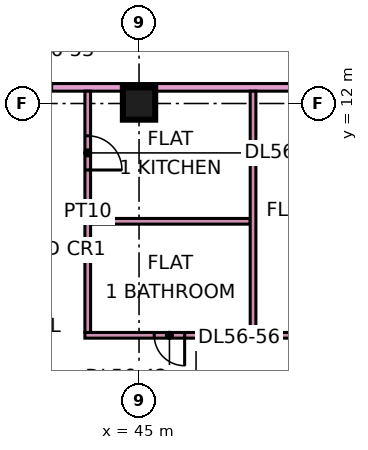
"""IFC4 building model, lengths in metres.
Left out: names, types, materials, properties, quantities, classifications, styles, units other than length and angle.
Written with IfcOpenShell. Run it as: python <this file> out.ifc"""

import sys

from ifc_helpers import new_model, si_unit, direction, frame, frame_2d, origin, origin_2d, place, context, subcontext, project, spatial, rectangle, extrude, element, fill, save


model = new_model("IFC4")
c1 = context("Model", 3, precision=1e-05, world=origin(), true_north=direction((0.0, 1.0)))
c2 = subcontext(c1, "Body", "Model", "MODEL_VIEW")
j1 = project(units=[si_unit("LENGTHUNIT", "METRE"), si_unit("PLANEANGLEUNIT", "RADIAN")], contexts=[c1])
p1 = place(None, origin())
s1 = spatial("IfcSite", under=j1, at=p1, CompositionType="ELEMENT")
p2 = place(p1, origin())
s2 = spatial("IfcBuilding", under=s1, at=p2, CompositionType="ELEMENT")
p3 = place(p2, frame((0.0, 0.0, 237.9)))
s3 = spatial("IfcBuildingStorey", under=s2, at=p3, CompositionType="ELEMENT", Elevation=237.9)
p4 = place(p3, frame((45.0, 12.0, 0.0), z_axis=(0.0, 0.0, 1.0), x_axis=(1.0, 0.0, 0.0)))
e1 = element("IfcColumn", 1, at=p4, inside=s3, PredefinedType="COLUMN", context=c2, shape_type="SweptSolid", body=[
    extrude(rectangle(XDim=0.85, YDim=0.85, at=origin_2d()), origin(), (0.0, 0.0, 1.0), 3.75),
])
p5 = place(p3, frame((40.65, 12.425, 0.0), z_axis=(0.0, 0.0, 1.0), x_axis=(1.0, 0.0, 0.0)))
e2 = element("IfcWall", 2, at=p5, inside=s3, PredefinedType="PARTITIONING", context=c2, shape_type="SweptSolid", body=[
    extrude(rectangle(XDim=22.35, YDim=0.2, at=frame_2d((11.175, 0.0))), origin(), (0.0, 0.0, 1.0), 3.35),
])
p6 = place(p5, frame((14.7, 0.0, 0.0)))
e3 = element("IfcOpeningElement", 3, at=p6, cuts=e2, PredefinedType="OPENING", context=c2, shape_type="SweptSolid", body=[
    extrude(rectangle(XDim=1.0, YDim=2.1, at=frame_2d((0.5, 1.05))), frame((0.0, 0.11, 0.0), z_axis=(0.0, -1.0, 0.0), x_axis=(1.0, 0.0, 0.0)), (0.0, 0.0, 1.0), 0.22),
])
p7 = place(p5, frame((1.05, 0.0, 0.0)))
e4 = element("IfcOpeningElement", 4, at=p7, cuts=e2, PredefinedType="OPENING", context=c2, shape_type="SweptSolid", body=[
    extrude(rectangle(XDim=1.0, YDim=2.1, at=frame_2d((0.5, 1.05))), frame((0.0, 0.11, 0.0), z_axis=(0.0, -1.0, 0.0), x_axis=(1.0, 0.0, 0.0)), (0.0, 0.0, 1.0), 0.22),
])
p8 = place(p3, frame((43.575, 5.9, 0.0), z_axis=(0.0, 0.0, 1.0), x_axis=(1.0, 0.0, 0.0)))
e5 = element("IfcWall", 5, at=p8, inside=s3, PredefinedType="PARTITIONING", context=c2, shape_type="SweptSolid", body=[
    extrude(rectangle(XDim=10.325, YDim=0.15, at=frame_2d((5.163, 0.0))), origin(), (0.0, 0.0, 1.0), 3.35),
])
p9 = place(p8, frame((1.825, 0.0, 0.0)))
e6 = element("IfcOpeningElement", 6, at=p9, cuts=e5, PredefinedType="OPENING", context=c2, shape_type="SweptSolid", body=[
    extrude(rectangle(XDim=0.8, YDim=2.1, at=frame_2d((0.4, 1.05))), frame((0.0, 0.085, 0.0), z_axis=(0.0, -1.0, 0.0), x_axis=(1.0, 0.0, 0.0)), (0.0, 0.0, 1.0), 0.17),
])
p10 = place(p8, frame((6.975, 0.0, 0.0)))
e7 = element("IfcOpeningElement", 7, at=p10, cuts=e5, PredefinedType="OPENING", context=c2, shape_type="SweptSolid", body=[
    extrude(rectangle(XDim=0.9, YDim=2.1, at=frame_2d((0.45, 1.05))), frame((0.0, 0.085, 0.0), z_axis=(0.0, -1.0, 0.0), x_axis=(1.0, 0.0, 0.0)), (0.0, 0.0, 1.0), 0.17),
])
p11 = place(p3, frame((43.65, 5.975, 0.0), z_axis=(0.0, 0.0, 1.0), x_axis=(0.0, 1.0, 0.0)))
e8 = element("IfcWall", 8, at=p11, inside=s3, PredefinedType="PARTITIONING", context=c2, shape_type="SweptSolid", body=[
    extrude(rectangle(XDim=6.35, YDim=0.15, at=frame_2d((3.175, 0.0))), origin(), (0.0, 0.0, 1.0), 3.35),
])
p12 = place(p11, frame((4.275, 0.0, 0.0)))
e9 = element("IfcOpeningElement", 9, at=p12, cuts=e8, PredefinedType="OPENING", context=c2, shape_type="SweptSolid", body=[
    extrude(rectangle(XDim=0.9, YDim=2.1, at=frame_2d((0.45, 1.05))), frame((0.0, 0.085, 0.0), z_axis=(0.0, -1.0, 0.0), x_axis=(1.0, 0.0, 0.0)), (0.0, 0.0, 1.0), 0.17),
])
p13 = place(p3, frame((43.725, 8.9, 0.0), z_axis=(0.0, 0.0, 1.0), x_axis=(1.0, 0.0, 0.0)))
e10 = element("IfcWall", 10, at=p13, inside=s3, PredefinedType="PARTITIONING", context=c2, shape_type="SweptSolid", body=[
    extrude(rectangle(XDim=4.2, YDim=0.15, at=frame_2d((2.1, 0.0))), origin(), (0.0, 0.0, 1.0), 3.35),
])
p14 = place(p3, frame((48.0, 5.975, 0.0), z_axis=(0.0, 0.0, 1.0), x_axis=(0.0, 1.0, 0.0)))
e11 = element("IfcWall", 11, at=p14, inside=s3, PredefinedType="PARTITIONING", context=c2, shape_type="SweptSolid", body=[
    extrude(rectangle(XDim=6.35, YDim=0.15, at=frame_2d((3.175, 0.0))), origin(), (0.0, 0.0, 1.0), 3.35),
])
p15 = place(p9, origin())
e12 = element("IfcDoor", 12, at=p15, inside=s3, OperationType="SINGLE_SWING_RIGHT", PredefinedType="DOOR", context=c2, shape_type="SweptSolid", body=[
    extrude(rectangle(XDim=0.8, YDim=2.1, at=frame_2d((0.4, 1.05))), frame((0.0, 0.025, 0.0), z_axis=(0.0, -1.0, 0.0), x_axis=(1.0, 0.0, 0.0)), (0.0, 0.0, 1.0), 0.05),
])
fill(e6, e12)
p16 = place(p12, frame((0.9, 0.0, 0.0), z_axis=(0.0, 0.0, 1.0), x_axis=(-1.0, 0.0, 0.0)))
e13 = element("IfcDoor", 13, at=p16, inside=s3, OperationType="SINGLE_SWING_LEFT", PredefinedType="DOOR", context=c2, shape_type="SweptSolid", body=[
    extrude(rectangle(XDim=0.9, YDim=2.1, at=frame_2d((0.45, 1.05))), frame((0.0, 0.025, 0.0), z_axis=(0.0, -1.0, 0.0), x_axis=(1.0, 0.0, 0.0)), (0.0, 0.0, 1.0), 0.05),
])
fill(e9, e13)
save(model, sys.argv[1])
